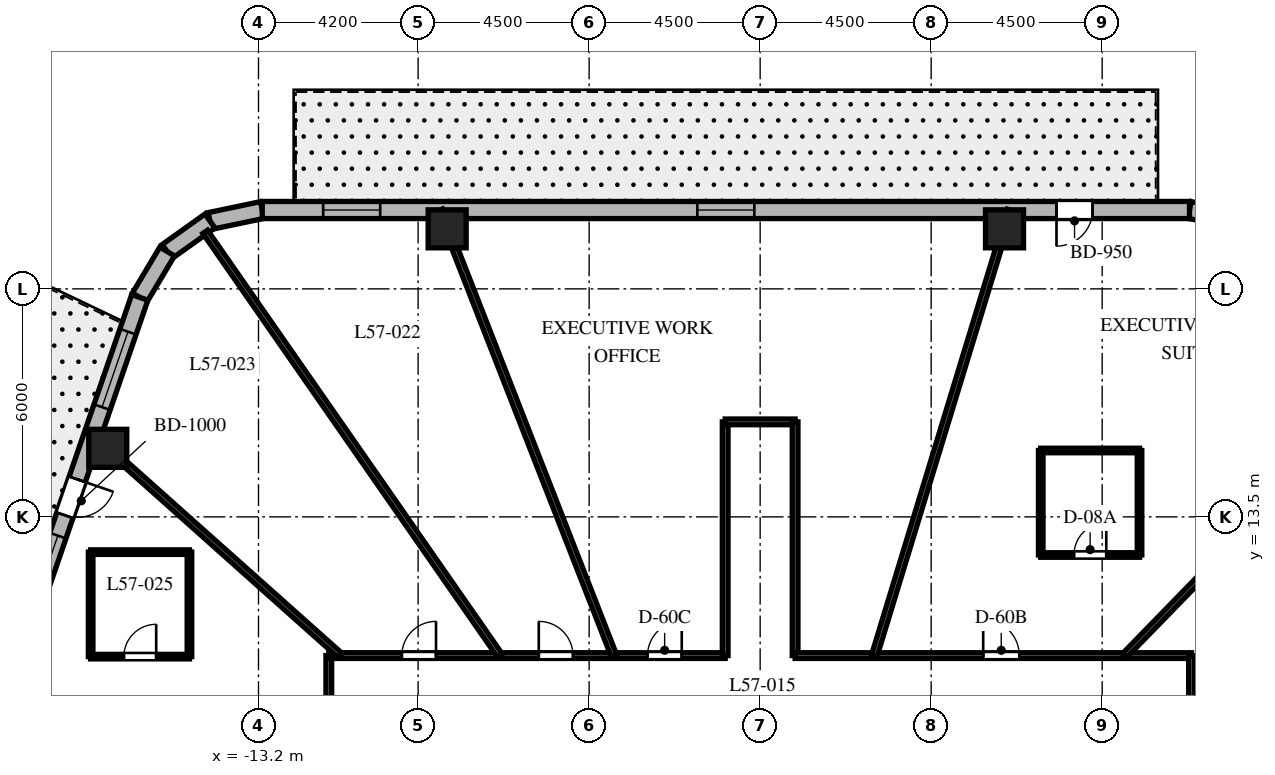
"""IFC4 building model, lengths in metres.
Left out: names, types, materials, properties, quantities, classifications, styles, units other than length and angle.
Written with IfcOpenShell. Run it as: python <this file> out.ifc"""

import sys

from ifc_helpers import new_model, si_unit, direction, frame, frame_2d, origin, origin_2d, place, context, subcontext, project, spatial, rectangle, extrude, element, fill, save


model = new_model("IFC4")
c1 = context("Model", 3, precision=1e-05, world=origin(), true_north=direction((0.0, 1.0)))
c2 = subcontext(c1, "Body", "Model", "MODEL_VIEW")
j1 = project(units=[si_unit("LENGTHUNIT", "METRE"), si_unit("PLANEANGLEUNIT", "RADIAN")], contexts=[c1])
p1 = place(None, origin())
s1 = spatial("IfcSite", under=j1, at=p1, CompositionType="ELEMENT")
p2 = place(p1, origin())
s2 = spatial("IfcBuilding", under=s1, at=p2, CompositionType="ELEMENT")
p3 = place(p2, frame((0.0, 0.0, 229.3)))
s3 = spatial("IfcBuildingStorey", under=s2, at=p3, CompositionType="ELEMENT", Elevation=229.3)
for number, where, z_axis, x_axis in (
    (1, (6.43, 21.08, 0.0), (0.0, 0.0, 1.0), (1.0, 0.0, 0.0)),
    (2, (-8.236, 21.08, 0.0), (0.0, 0.0, 1.0), (1.0, 0.0, 0.0)),
    (3, (-17.166, 15.304, 0.0), (0.0, 0.0, 1.0), (1.0, 0.0, 0.0)),
):
    element("IfcColumn", number, at=place(p3, frame(where, z_axis=z_axis, x_axis=x_axis)), inside=s3, PredefinedType="COLUMN", context=c2, shape_type="SweptSolid", body=[
        extrude(rectangle(XDim=1.0, YDim=1.0, at=origin_2d()), origin(), (0.0, 0.0, 1.0), 3.8),
    ])
p4 = place(p3, frame((12.546, 21.34, 0.0), z_axis=(0.0, 0.0, 1.0), x_axis=(-0.982686750835, 0.18527479519, 0.0)))
e4 = element("IfcWall", 4, at=p4, inside=s3, PredefinedType="SOLIDWALL", context=c2, shape_type="SweptSolid", body=[
    extrude(rectangle(XDim=1.27, YDim=0.45, at=frame_2d((0.635, 0.0))), origin(), (0.0, 0.0, 1.0), 3.5),
])
p5 = place(p3, frame((-13.102, 21.575, 0.0), z_axis=(0.0, 0.0, 1.0), x_axis=(-0.978757421505, -0.205021730188, 0.0)))
e5 = element("IfcWall", 5, at=p5, inside=s3, PredefinedType="SOLIDWALL", context=c2, shape_type="SweptSolid", body=[
    extrude(rectangle(XDim=1.406, YDim=0.45, at=frame_2d((0.703, 0.0))), origin(), (0.0, 0.0, 1.0), 3.5),
])
p6 = place(p3, frame((-14.478, 21.287, 0.0), z_axis=(0.0, 0.0, 1.0), x_axis=(-0.813888518617, -0.58102106611, 0.0)))
e6 = element("IfcWall", 6, at=p6, inside=s3, PredefinedType="SOLIDWALL", context=c2, shape_type="SweptSolid", body=[
    extrude(rectangle(XDim=1.383, YDim=0.45, at=frame_2d((0.691, 0.0))), origin(), (0.0, 0.0, 1.0), 3.5),
])
p7 = place(p3, frame((-15.604, 20.483, 0.0), z_axis=(0.0, 0.0, 1.0), x_axis=(-0.512222149036, -0.858852996756, 0.0)))
e7 = element("IfcWall", 7, at=p7, inside=s3, PredefinedType="SOLIDWALL", context=c2, shape_type="SweptSolid", body=[
    extrude(rectangle(XDim=1.406, YDim=0.45, at=frame_2d((0.703, 0.0))), origin(), (0.0, 0.0, 1.0), 3.5),
])
p8 = place(p3, frame((11.298, 21.575, 0.0), z_axis=(0.0, 0.0, 1.0), x_axis=(-1.0, 0.0, 0.0)))
e8 = element("IfcWall", 8, at=p8, inside=s3, PredefinedType="SOLIDWALL", context=c2, shape_type="SweptSolid", body=[
    extrude(rectangle(XDim=24.399, YDim=0.45, at=frame_2d((12.2, 0.0))), origin(), (0.0, 0.0, 1.0), 3.5),
])
p9 = place(p8, frame((2.55, 0.0, 0.0)))
e9 = element("IfcOpeningElement", 9, at=p9, cuts=e8, PredefinedType="OPENING", context=c2, shape_type="SweptSolid", body=[
    extrude(rectangle(XDim=0.95, YDim=2.15, at=frame_2d((0.475, 1.075))), frame((0.0, 0.235, 0.0), z_axis=(0.0, -1.0, 0.0), x_axis=(1.0, 0.0, 0.0)), (0.0, 0.0, 1.0), 0.47),
])
p10 = place(p8, frame((11.451, 0.0, 0.8)))
e10 = element("IfcOpeningElement", 10, at=p10, cuts=e8, PredefinedType="OPENING", context=c2, shape_type="SweptSolid", body=[
    extrude(rectangle(XDim=1.5, YDim=1.8, at=frame_2d((0.75, 0.9))), frame((0.0, 0.235, 0.0), z_axis=(0.0, -1.0, 0.0), x_axis=(1.0, 0.0, 0.0)), (0.0, 0.0, 1.0), 0.47),
])
p11 = place(p8, frame((21.296, 0.0, 0.8)))
e11 = element("IfcOpeningElement", 11, at=p11, cuts=e8, PredefinedType="OPENING", context=c2, shape_type="SweptSolid", body=[
    extrude(rectangle(XDim=1.5, YDim=1.8, at=frame_2d((0.75, 0.9))), frame((0.0, 0.235, 0.0), z_axis=(0.0, -1.0, 0.0), x_axis=(1.0, 0.0, 0.0)), (0.0, 0.0, 1.0), 0.47),
])
p12 = place(p3, frame((-16.324, 19.275, 0.0), z_axis=(0.0, 0.0, 1.0), x_axis=(-0.325083142304, -0.945685439557, 0.0)))
e12 = element("IfcWall", 12, at=p12, inside=s3, PredefinedType="SOLIDWALL", context=c2, shape_type="SweptSolid", body=[
    extrude(rectangle(XDim=20.224, YDim=0.45, at=frame_2d((10.112, 0.0))), origin(), (0.0, 0.0, 1.0), 3.5),
])
p13 = place(p12, frame((5.062, 0.0, 0.0)))
e13 = element("IfcOpeningElement", 13, at=p13, cuts=e12, PredefinedType="OPENING", context=c2, shape_type="SweptSolid", body=[
    extrude(rectangle(XDim=1.0, YDim=2.15, at=frame_2d((0.5, 1.075))), frame((0.0, 0.235, 0.0), z_axis=(0.0, -1.0, 0.0), x_axis=(1.0, 0.0, 0.0)), (0.0, 0.0, 1.0), 0.47),
])
p14 = place(p12, frame((0.953, 0.0, 0.8)))
e14 = element("IfcOpeningElement", 14, at=p14, cuts=e12, PredefinedType="OPENING", context=c2, shape_type="SweptSolid", body=[
    extrude(rectangle(XDim=2.1, YDim=1.85, at=frame_2d((1.05, 0.925))), frame((0.0, 0.235, 0.0), z_axis=(0.0, -1.0, 0.0), x_axis=(1.0, 0.0, 0.0)), (0.0, 0.0, 1.0), 0.47),
])
p15 = place(p12, frame((6.629, 0.0, 0.8)))
e15 = element("IfcOpeningElement", 15, at=p15, cuts=e12, PredefinedType="OPENING", context=c2, shape_type="SweptSolid", body=[
    extrude(rectangle(XDim=2.1, YDim=1.85, at=frame_2d((1.05, 0.925))), frame((0.0, 0.235, 0.0), z_axis=(0.0, -1.0, 0.0), x_axis=(1.0, 0.0, 0.0)), (0.0, 0.0, 1.0), 0.47),
])
p16 = place(p12, frame((12.312, 0.0, 0.8)))
e16 = element("IfcOpeningElement", 16, at=p16, cuts=e12, PredefinedType="OPENING", context=c2, shape_type="SweptSolid", body=[
    extrude(rectangle(XDim=2.1, YDim=1.85, at=frame_2d((1.05, 0.925))), frame((0.0, 0.235, 0.0), z_axis=(0.0, -1.0, 0.0), x_axis=(1.0, 0.0, 0.0)), (0.0, 0.0, 1.0), 0.47),
])
p17 = place(p12, frame((17.118, 0.0, 0.8)))
e17 = element("IfcOpeningElement", 17, at=p17, cuts=e12, PredefinedType="OPENING", context=c2, shape_type="SweptSolid", body=[
    extrude(rectangle(XDim=2.1, YDim=1.85, at=frame_2d((1.05, 0.925))), frame((0.0, 0.235, 0.0), z_axis=(0.0, -1.0, 0.0), x_axis=(1.0, 0.0, 0.0)), (0.0, 0.0, 1.0), 0.47),
])
p18 = place(p3, frame((-11.35, 4.4, 0.0), z_axis=(0.0, 0.0, 1.0), x_axis=(0.0, 1.0, 0.0)))
e18 = element("IfcWall", 18, at=p18, inside=s3, PredefinedType="PARTITIONING", context=c2, shape_type="SweptSolid", body=[
    extrude(rectangle(XDim=5.45, YDim=0.15, at=frame_2d((2.725, 0.0))), origin(), (0.0, 0.0, 1.0), 2.99),
])
p19 = place(p18, frame((2.466, 0.0, 0.0)))
e19 = element("IfcOpeningElement", 19, at=p19, cuts=e18, PredefinedType="OPENING", context=c2, shape_type="SweptSolid", body=[
    extrude(rectangle(XDim=0.95, YDim=2.03, at=frame_2d((0.475, 1.015))), frame((0.0, 0.085, 0.0), z_axis=(0.0, -1.0, 0.0), x_axis=(1.0, 0.0, 0.0)), (0.0, 0.0, 1.0), 0.17),
])
p20 = place(p3, frame((-11.35, 9.85, 0.0), z_axis=(0.0, 0.0, 1.0), x_axis=(1.0, 0.0, 0.0)))
e20 = element("IfcWall", 20, at=p20, inside=s3, PredefinedType="PARTITIONING", context=c2, shape_type="SweptSolid", body=[
    extrude(rectangle(XDim=10.43, YDim=0.15, at=frame_2d((5.215, 0.0))), origin(), (0.0, 0.0, 1.0), 2.99),
])
p21 = place(p20, frame((8.387, 0.0, 0.0)))
e21 = element("IfcOpeningElement", 21, at=p21, cuts=e20, PredefinedType="OPENING", context=c2, shape_type="SweptSolid", body=[
    extrude(rectangle(XDim=0.9, YDim=2.03, at=frame_2d((0.45, 1.015))), frame((0.0, 0.085, 0.0), z_axis=(0.0, -1.0, 0.0), x_axis=(1.0, 0.0, 0.0)), (0.0, 0.0, 1.0), 0.17),
])
p22 = place(p20, frame((5.525, 0.0, 0.0)))
e22 = element("IfcOpeningElement", 22, at=p22, cuts=e20, PredefinedType="OPENING", context=c2, shape_type="SweptSolid", body=[
    extrude(rectangle(XDim=0.9, YDim=2.03, at=frame_2d((0.45, 1.015))), frame((0.0, 0.085, 0.0), z_axis=(0.0, -1.0, 0.0), x_axis=(1.0, 0.0, 0.0)), (0.0, 0.0, 1.0), 0.17),
])
p23 = place(p20, frame((1.921, 0.0, 0.0)))
e23 = element("IfcOpeningElement", 23, at=p23, cuts=e20, PredefinedType="OPENING", context=c2, shape_type="SweptSolid", body=[
    extrude(rectangle(XDim=0.9, YDim=2.03, at=frame_2d((0.45, 1.015))), frame((0.0, 0.085, 0.0), z_axis=(0.0, -1.0, 0.0), x_axis=(1.0, 0.0, 0.0)), (0.0, 0.0, 1.0), 0.17),
])
p24 = place(p3, frame((-0.92, 9.85, 0.0), z_axis=(0.0, 0.0, 1.0), x_axis=(0.0, 1.0, 0.0)))
e24 = element("IfcWall", 24, at=p24, inside=s3, PredefinedType="PARTITIONING", context=c2, shape_type="SweptSolid", body=[
    extrude(rectangle(XDim=6.15, YDim=0.15, at=frame_2d((3.075, 0.0))), origin(), (0.0, 0.0, 1.0), 3.026),
])
p25 = place(p3, frame((-0.92, 16.0, 0.0), z_axis=(0.0, 0.0, 1.0), x_axis=(1.0, 0.0, 0.0)))
e25 = element("IfcWall", 25, at=p25, inside=s3, PredefinedType="PARTITIONING", context=c2, shape_type="SweptSolid", body=[
    extrude(rectangle(XDim=1.84, YDim=0.15, at=frame_2d((0.92, 0.0))), origin(), (0.0, 0.0, 1.0), 3.5),
])
p26 = place(p3, frame((0.92, 16.0, 0.0), z_axis=(0.0, 0.0, 1.0), x_axis=(0.0, -1.0, 0.0)))
e26 = element("IfcWall", 26, at=p26, inside=s3, PredefinedType="PARTITIONING", context=c2, shape_type="SweptSolid", body=[
    extrude(rectangle(XDim=6.15, YDim=0.15, at=frame_2d((3.075, 0.0))), origin(), (0.0, 0.0, 1.0), 3.026),
])
p27 = place(p3, frame((0.92, 9.85, 0.0), z_axis=(0.0, 0.0, 1.0), x_axis=(1.0, 0.0, 0.0)))
e27 = element("IfcWall", 27, at=p27, inside=s3, PredefinedType="PARTITIONING", context=c2, shape_type="SweptSolid", body=[
    extrude(rectangle(XDim=10.43, YDim=0.15, at=frame_2d((5.215, 0.0))), origin(), (0.0, 0.0, 1.0), 2.99),
])
p28 = place(p27, frame((4.949, 0.0, 0.0)))
e28 = element("IfcOpeningElement", 28, at=p28, cuts=e27, PredefinedType="OPENING", context=c2, shape_type="SweptSolid", body=[
    extrude(rectangle(XDim=0.95, YDim=2.03, at=frame_2d((0.475, 1.015))), frame((0.0, 0.085, 0.0), z_axis=(0.0, -1.0, 0.0), x_axis=(1.0, 0.0, 0.0)), (0.0, 0.0, 1.0), 0.17),
])
p29 = place(p3, frame((11.35, 9.85, 0.0), z_axis=(0.0, 0.0, 1.0), x_axis=(0.0, -1.0, 0.0)))
e29 = element("IfcWall", 29, at=p29, inside=s3, PredefinedType="PARTITIONING", context=c2, shape_type="SweptSolid", body=[
    extrude(rectangle(XDim=12.4, YDim=0.15, at=frame_2d((6.2, 0.0))), origin(), (0.0, 0.0, 1.0), 2.99),
])
p30 = place(p29, frame((4.443, 0.0, 0.0)))
e30 = element("IfcOpeningElement", 30, at=p30, cuts=e29, PredefinedType="OPENING", context=c2, shape_type="SweptSolid", body=[
    extrude(rectangle(XDim=0.95, YDim=2.03, at=frame_2d((0.475, 1.015))), frame((0.0, 0.085, 0.0), z_axis=(0.0, -1.0, 0.0), x_axis=(1.0, 0.0, 0.0)), (0.0, 0.0, 1.0), 0.17),
])
p31 = place(p29, frame((1.242, 0.0, 0.0)))
e31 = element("IfcOpeningElement", 31, at=p31, cuts=e29, PredefinedType="OPENING", context=c2, shape_type="SweptSolid", body=[
    extrude(rectangle(XDim=0.9, YDim=2.03, at=frame_2d((0.45, 1.015))), frame((0.0, 0.085, 0.0), z_axis=(0.0, -1.0, 0.0), x_axis=(1.0, 0.0, 0.0)), (0.0, 0.0, 1.0), 0.17),
])
p32 = place(p29, frame((8.835, 0.0, 0.0)))
e32 = element("IfcOpeningElement", 32, at=p32, cuts=e29, PredefinedType="OPENING", context=c2, shape_type="SweptSolid", body=[
    extrude(rectangle(XDim=0.95, YDim=2.03, at=frame_2d((0.475, 1.015))), frame((0.0, 0.085, 0.0), z_axis=(0.0, -1.0, 0.0), x_axis=(1.0, 0.0, 0.0)), (0.0, 0.0, 1.0), 0.17),
])
p33 = place(p3, frame((11.35, 6.705, 0.0), z_axis=(0.0, 0.0, 1.0), x_axis=(0.86097625004, 0.508645158108, 0.0)))
e33 = element("IfcWall", 33, at=p33, inside=s3, PredefinedType="PARTITIONING", context=c2, shape_type="SweptSolid", body=[
    extrude(rectangle(XDim=8.406, YDim=0.15, at=frame_2d((4.203, 0.0))), origin(), (0.0, 0.0, 1.0), 2.74),
])
p34 = place(p3, frame((9.588, 9.85, 0.0), z_axis=(0.0, 0.0, 1.0), x_axis=(0.697519469595, 0.716565830567, 0.0)))
e34 = element("IfcWall", 34, at=p34, inside=s3, PredefinedType="PARTITIONING", context=c2, shape_type="SweptSolid", body=[
    extrude(rectangle(XDim=9.126, YDim=0.15, at=frame_2d((4.563, 0.0))), origin(), (0.0, 0.0, 1.0), 2.74),
])
p35 = place(p3, frame((3.004, 9.85, 0.0), z_axis=(0.0, 0.0, 1.0), x_axis=(0.291775760688, 0.956486751333, 0.0)))
e35 = element("IfcWall", 35, at=p35, inside=s3, PredefinedType="PARTITIONING", context=c2, shape_type="SweptSolid", body=[
    extrude(rectangle(XDim=12.258, YDim=0.15, at=frame_2d((6.129, 0.0))), origin(), (0.0, 0.0, 1.0), 2.74),
])
p36 = place(p3, frame((-3.848, 9.85, 0.0), z_axis=(0.0, 0.0, 1.0), x_axis=(-0.363921778212, 0.931429513889, 0.0)))
e36 = element("IfcWall", 36, at=p36, inside=s3, PredefinedType="PARTITIONING", context=c2, shape_type="SweptSolid", body=[
    extrude(rectangle(XDim=12.588, YDim=0.15, at=frame_2d((6.294, 0.0))), origin(), (0.0, 0.0, 1.0), 2.74),
])
p37 = place(p3, frame((-6.849, 9.85, 0.0), z_axis=(0.0, 0.0, 1.0), x_axis=(-0.570871709026, 0.821039275451, 0.0)))
e37 = element("IfcWall", 37, at=p37, inside=s3, PredefinedType="PARTITIONING", context=c2, shape_type="SweptSolid", body=[
    extrude(rectangle(XDim=13.582, YDim=0.15, at=frame_2d((6.791, 0.0))), origin(), (0.0, 0.0, 1.0), 2.74),
])
p38 = place(p3, frame((-11.048, 9.85, 0.0), z_axis=(0.0, 0.0, 1.0), x_axis=(-0.746444434655, 0.665447748492, 0.0)))
e38 = element("IfcWall", 38, at=p38, inside=s3, PredefinedType="PARTITIONING", context=c2, shape_type="SweptSolid", body=[
    extrude(rectangle(XDim=8.732, YDim=0.15, at=frame_2d((4.366, 0.0))), origin(), (0.0, 0.0, 1.0), 2.74),
])
p39 = place(p3, frame((-11.35, 5.072, 0.0), z_axis=(0.0, 0.0, 1.0), x_axis=(-0.912980177983, 0.408003914944, 0.0)))
e39 = element("IfcWall", 39, at=p39, inside=s3, PredefinedType="PARTITIONING", context=c2, shape_type="SweptSolid", body=[
    extrude(rectangle(XDim=9.358, YDim=0.15, at=frame_2d((4.679, 0.0))), origin(), (0.0, 0.0, 1.0), 2.74),
])
p40 = place(p3, frame((7.383, 12.497, 0.0), z_axis=(0.0, 0.0, 1.0), x_axis=(1.0, 0.0, 0.0)))
e40 = element("IfcWall", 40, at=p40, inside=s3, PredefinedType="PARTITIONING", context=c2, shape_type="SweptSolid", body=[
    extrude(rectangle(XDim=2.6, YDim=0.12, at=frame_2d((1.3, 0.0))), origin(), (0.0, 0.0, 1.0), 2.94),
])
p41 = place(p40, frame((0.875, 0.0, 0.0)))
e41 = element("IfcOpeningElement", 41, at=p41, cuts=e40, PredefinedType="OPENING", context=c2, shape_type="SweptSolid", body=[
    extrude(rectangle(XDim=0.85, YDim=2.03, at=frame_2d((0.425, 1.015))), frame((0.0, 0.07, 0.0), z_axis=(0.0, -1.0, 0.0), x_axis=(1.0, 0.0, 0.0)), (0.0, 0.0, 1.0), 0.14),
])
p42 = place(p3, frame((9.983, 12.497, 0.0), z_axis=(0.0, 0.0, 1.0), x_axis=(0.0, 1.0, 0.0)))
e42 = element("IfcWall", 42, at=p42, inside=s3, PredefinedType="PARTITIONING", context=c2, shape_type="SweptSolid", body=[
    extrude(rectangle(XDim=2.75, YDim=0.12, at=frame_2d((1.375, 0.0))), origin(), (0.0, 0.0, 1.0), 3.072),
])
p43 = place(p3, frame((9.983, 15.247, 0.0), z_axis=(0.0, 0.0, 1.0), x_axis=(-1.0, 0.0, 0.0)))
e43 = element("IfcWall", 43, at=p43, inside=s3, PredefinedType="PARTITIONING", context=c2, shape_type="SweptSolid", body=[
    extrude(rectangle(XDim=2.6, YDim=0.12, at=frame_2d((1.3, 0.0))), origin(), (0.0, 0.0, 1.0), 3.072),
])
p44 = place(p3, frame((7.383, 15.247, 0.0), z_axis=(0.0, 0.0, 1.0), x_axis=(0.0, -1.0, 0.0)))
e44 = element("IfcWall", 44, at=p44, inside=s3, PredefinedType="PARTITIONING", context=c2, shape_type="SweptSolid", body=[
    extrude(rectangle(XDim=2.75, YDim=0.12, at=frame_2d((1.375, 0.0))), origin(), (0.0, 0.0, 1.0), 2.94),
])
p45 = place(p3, frame((-17.617, 9.823, 0.0), z_axis=(0.0, 0.0, 1.0), x_axis=(1.0, 0.0, 0.0)))
e45 = element("IfcWall", 45, at=p45, inside=s3, PredefinedType="PARTITIONING", context=c2, shape_type="SweptSolid", body=[
    extrude(rectangle(XDim=2.6, YDim=0.12, at=frame_2d((1.3, 0.0))), origin(), (0.0, 0.0, 1.0), 3.072),
])
p46 = place(p45, frame((0.875, 0.0, 0.0)))
e46 = element("IfcOpeningElement", 46, at=p46, cuts=e45, PredefinedType="OPENING", context=c2, shape_type="SweptSolid", body=[
    extrude(rectangle(XDim=0.85, YDim=2.03, at=frame_2d((0.425, 1.015))), frame((0.0, 0.07, 0.0), z_axis=(0.0, -1.0, 0.0), x_axis=(1.0, 0.0, 0.0)), (0.0, 0.0, 1.0), 0.14),
])
p47 = place(p3, frame((-15.017, 9.823, 0.0), z_axis=(0.0, 0.0, 1.0), x_axis=(0.0, 1.0, 0.0)))
e47 = element("IfcWall", 47, at=p47, inside=s3, PredefinedType="PARTITIONING", context=c2, shape_type="SweptSolid", body=[
    extrude(rectangle(XDim=2.75, YDim=0.12, at=frame_2d((1.375, 0.0))), origin(), (0.0, 0.0, 1.0), 3.072),
])
p48 = place(p3, frame((-15.017, 12.573, 0.0), z_axis=(0.0, 0.0, 1.0), x_axis=(-1.0, 0.0, 0.0)))
e48 = element("IfcWall", 48, at=p48, inside=s3, PredefinedType="PARTITIONING", context=c2, shape_type="SweptSolid", body=[
    extrude(rectangle(XDim=2.6, YDim=0.12, at=frame_2d((1.3, 0.0))), origin(), (0.0, 0.0, 1.0), 3.5),
])
p49 = place(p3, frame((-17.617, 12.573, 0.0), z_axis=(0.0, 0.0, 1.0), x_axis=(0.0, -1.0, 0.0)))
e49 = element("IfcWall", 49, at=p49, inside=s3, PredefinedType="PARTITIONING", context=c2, shape_type="SweptSolid", body=[
    extrude(rectangle(XDim=2.75, YDim=0.12, at=frame_2d((1.375, 0.0))), origin(), (0.0, 0.0, 1.0), 3.5),
])
p50 = place(p9, origin())
e50 = element("IfcDoor", 50, at=p50, inside=s3, OperationType="SINGLE_SWING_RIGHT", PredefinedType="DOOR", context=c2, shape_type="SweptSolid", body=[
    extrude(rectangle(XDim=0.95, YDim=2.15, at=frame_2d((0.475, 1.075))), frame((0.0, 0.025, 0.0), z_axis=(0.0, -1.0, 0.0), x_axis=(1.0, 0.0, 0.0)), (0.0, 0.0, 1.0), 0.05),
])
fill(e9, e50)
p51 = place(p10, origin())
e51 = element("IfcWindow", 51, at=p51, inside=s3, PartitioningType="SINGLE_PANEL", PredefinedType="WINDOW", context=c2, shape_type="SweptSolid", body=[
    extrude(rectangle(XDim=1.5, YDim=1.8, at=frame_2d((0.75, 0.9))), frame((0.0, 0.03, 0.0), z_axis=(0.0, -1.0, 0.0), x_axis=(1.0, 0.0, 0.0)), (0.0, 0.0, 1.0), 0.06),
])
fill(e10, e51)
p52 = place(p11, origin())
e52 = element("IfcWindow", 52, at=p52, inside=s3, PartitioningType="SINGLE_PANEL", PredefinedType="WINDOW", context=c2, shape_type="SweptSolid", body=[
    extrude(rectangle(XDim=1.5, YDim=1.8, at=frame_2d((0.75, 0.9))), frame((0.0, 0.03, 0.0), z_axis=(0.0, -1.0, 0.0), x_axis=(1.0, 0.0, 0.0)), (0.0, 0.0, 1.0), 0.06),
])
fill(e11, e52)
p53 = place(p13, origin())
e53 = element("IfcDoor", 53, at=p53, inside=s3, OperationType="SINGLE_SWING_LEFT", PredefinedType="DOOR", context=c2, shape_type="SweptSolid", body=[
    extrude(rectangle(XDim=1.0, YDim=2.15, at=frame_2d((0.5, 1.075))), frame((0.0, 0.025, 0.0), z_axis=(0.0, -1.0, 0.0), x_axis=(1.0, 0.0, 0.0)), (0.0, 0.0, 1.0), 0.05),
])
fill(e13, e53)
p54 = place(p14, origin())
e54 = element("IfcWindow", 54, at=p54, inside=s3, PartitioningType="SINGLE_PANEL", PredefinedType="WINDOW", context=c2, shape_type="SweptSolid", body=[
    extrude(rectangle(XDim=2.1, YDim=1.85, at=frame_2d((1.05, 0.925))), frame((0.0, 0.03, 0.0), z_axis=(0.0, -1.0, 0.0), x_axis=(1.0, 0.0, 0.0)), (0.0, 0.0, 1.0), 0.06),
])
fill(e14, e54)
p55 = place(p15, origin())
e55 = element("IfcWindow", 55, at=p55, inside=s3, PartitioningType="SINGLE_PANEL", PredefinedType="WINDOW", context=c2, shape_type="SweptSolid", body=[
    extrude(rectangle(XDim=2.1, YDim=1.85, at=frame_2d((1.05, 0.925))), frame((0.0, 0.03, 0.0), z_axis=(0.0, -1.0, 0.0), x_axis=(1.0, 0.0, 0.0)), (0.0, 0.0, 1.0), 0.06),
])
fill(e15, e55)
p56 = place(p28, origin())
e56 = element("IfcDoor", 56, at=p56, inside=s3, OperationType="SINGLE_SWING_LEFT", PredefinedType="DOOR", context=c2, shape_type="SweptSolid", body=[
    extrude(rectangle(XDim=0.95, YDim=2.03, at=frame_2d((0.475, 1.015))), frame((0.0, 0.025, 0.0), z_axis=(0.0, -1.0, 0.0), x_axis=(1.0, 0.0, 0.0)), (0.0, 0.0, 1.0), 0.05),
])
fill(e28, e56)
p57 = place(p41, origin())
e57 = element("IfcDoor", 57, at=p57, inside=s3, OperationType="SINGLE_SWING_RIGHT", PredefinedType="DOOR", context=c2, shape_type="SweptSolid", body=[
    extrude(rectangle(XDim=0.85, YDim=2.03, at=frame_2d((0.425, 1.015))), frame((0.0, 0.025, 0.0), z_axis=(0.0, -1.0, 0.0), x_axis=(1.0, 0.0, 0.0)), (0.0, 0.0, 1.0), 0.05),
])
fill(e41, e57)
p58 = place(p21, origin())
e58 = element("IfcDoor", 58, at=p58, inside=s3, OperationType="SINGLE_SWING_RIGHT", PredefinedType="DOOR", context=c2, shape_type="SweptSolid", body=[
    extrude(rectangle(XDim=0.9, YDim=2.03, at=frame_2d((0.45, 1.015))), frame((0.0, 0.025, 0.0), z_axis=(0.0, -1.0, 0.0), x_axis=(1.0, 0.0, 0.0)), (0.0, 0.0, 1.0), 0.05),
])
fill(e21, e58)
p59 = place(p22, origin())
e59 = element("IfcDoor", 59, at=p59, inside=s3, OperationType="SINGLE_SWING_LEFT", PredefinedType="DOOR", context=c2, shape_type="SweptSolid", body=[
    extrude(rectangle(XDim=0.9, YDim=2.03, at=frame_2d((0.45, 1.015))), frame((0.0, 0.025, 0.0), z_axis=(0.0, -1.0, 0.0), x_axis=(1.0, 0.0, 0.0)), (0.0, 0.0, 1.0), 0.05),
])
fill(e22, e59)
p60 = place(p23, origin())
e60 = element("IfcDoor", 60, at=p60, inside=s3, OperationType="SINGLE_SWING_RIGHT", PredefinedType="DOOR", context=c2, shape_type="SweptSolid", body=[
    extrude(rectangle(XDim=0.9, YDim=2.03, at=frame_2d((0.45, 1.015))), frame((0.0, 0.025, 0.0), z_axis=(0.0, -1.0, 0.0), x_axis=(1.0, 0.0, 0.0)), (0.0, 0.0, 1.0), 0.05),
])
fill(e23, e60)
p61 = place(p46, origin())
e61 = element("IfcDoor", 61, at=p61, inside=s3, OperationType="SINGLE_SWING_RIGHT", PredefinedType="DOOR", context=c2, shape_type="SweptSolid", body=[
    extrude(rectangle(XDim=0.85, YDim=2.03, at=frame_2d((0.425, 1.015))), frame((0.0, 0.025, 0.0), z_axis=(0.0, -1.0, 0.0), x_axis=(1.0, 0.0, 0.0)), (0.0, 0.0, 1.0), 0.05),
])
fill(e46, e61)
save(model, sys.argv[1])
